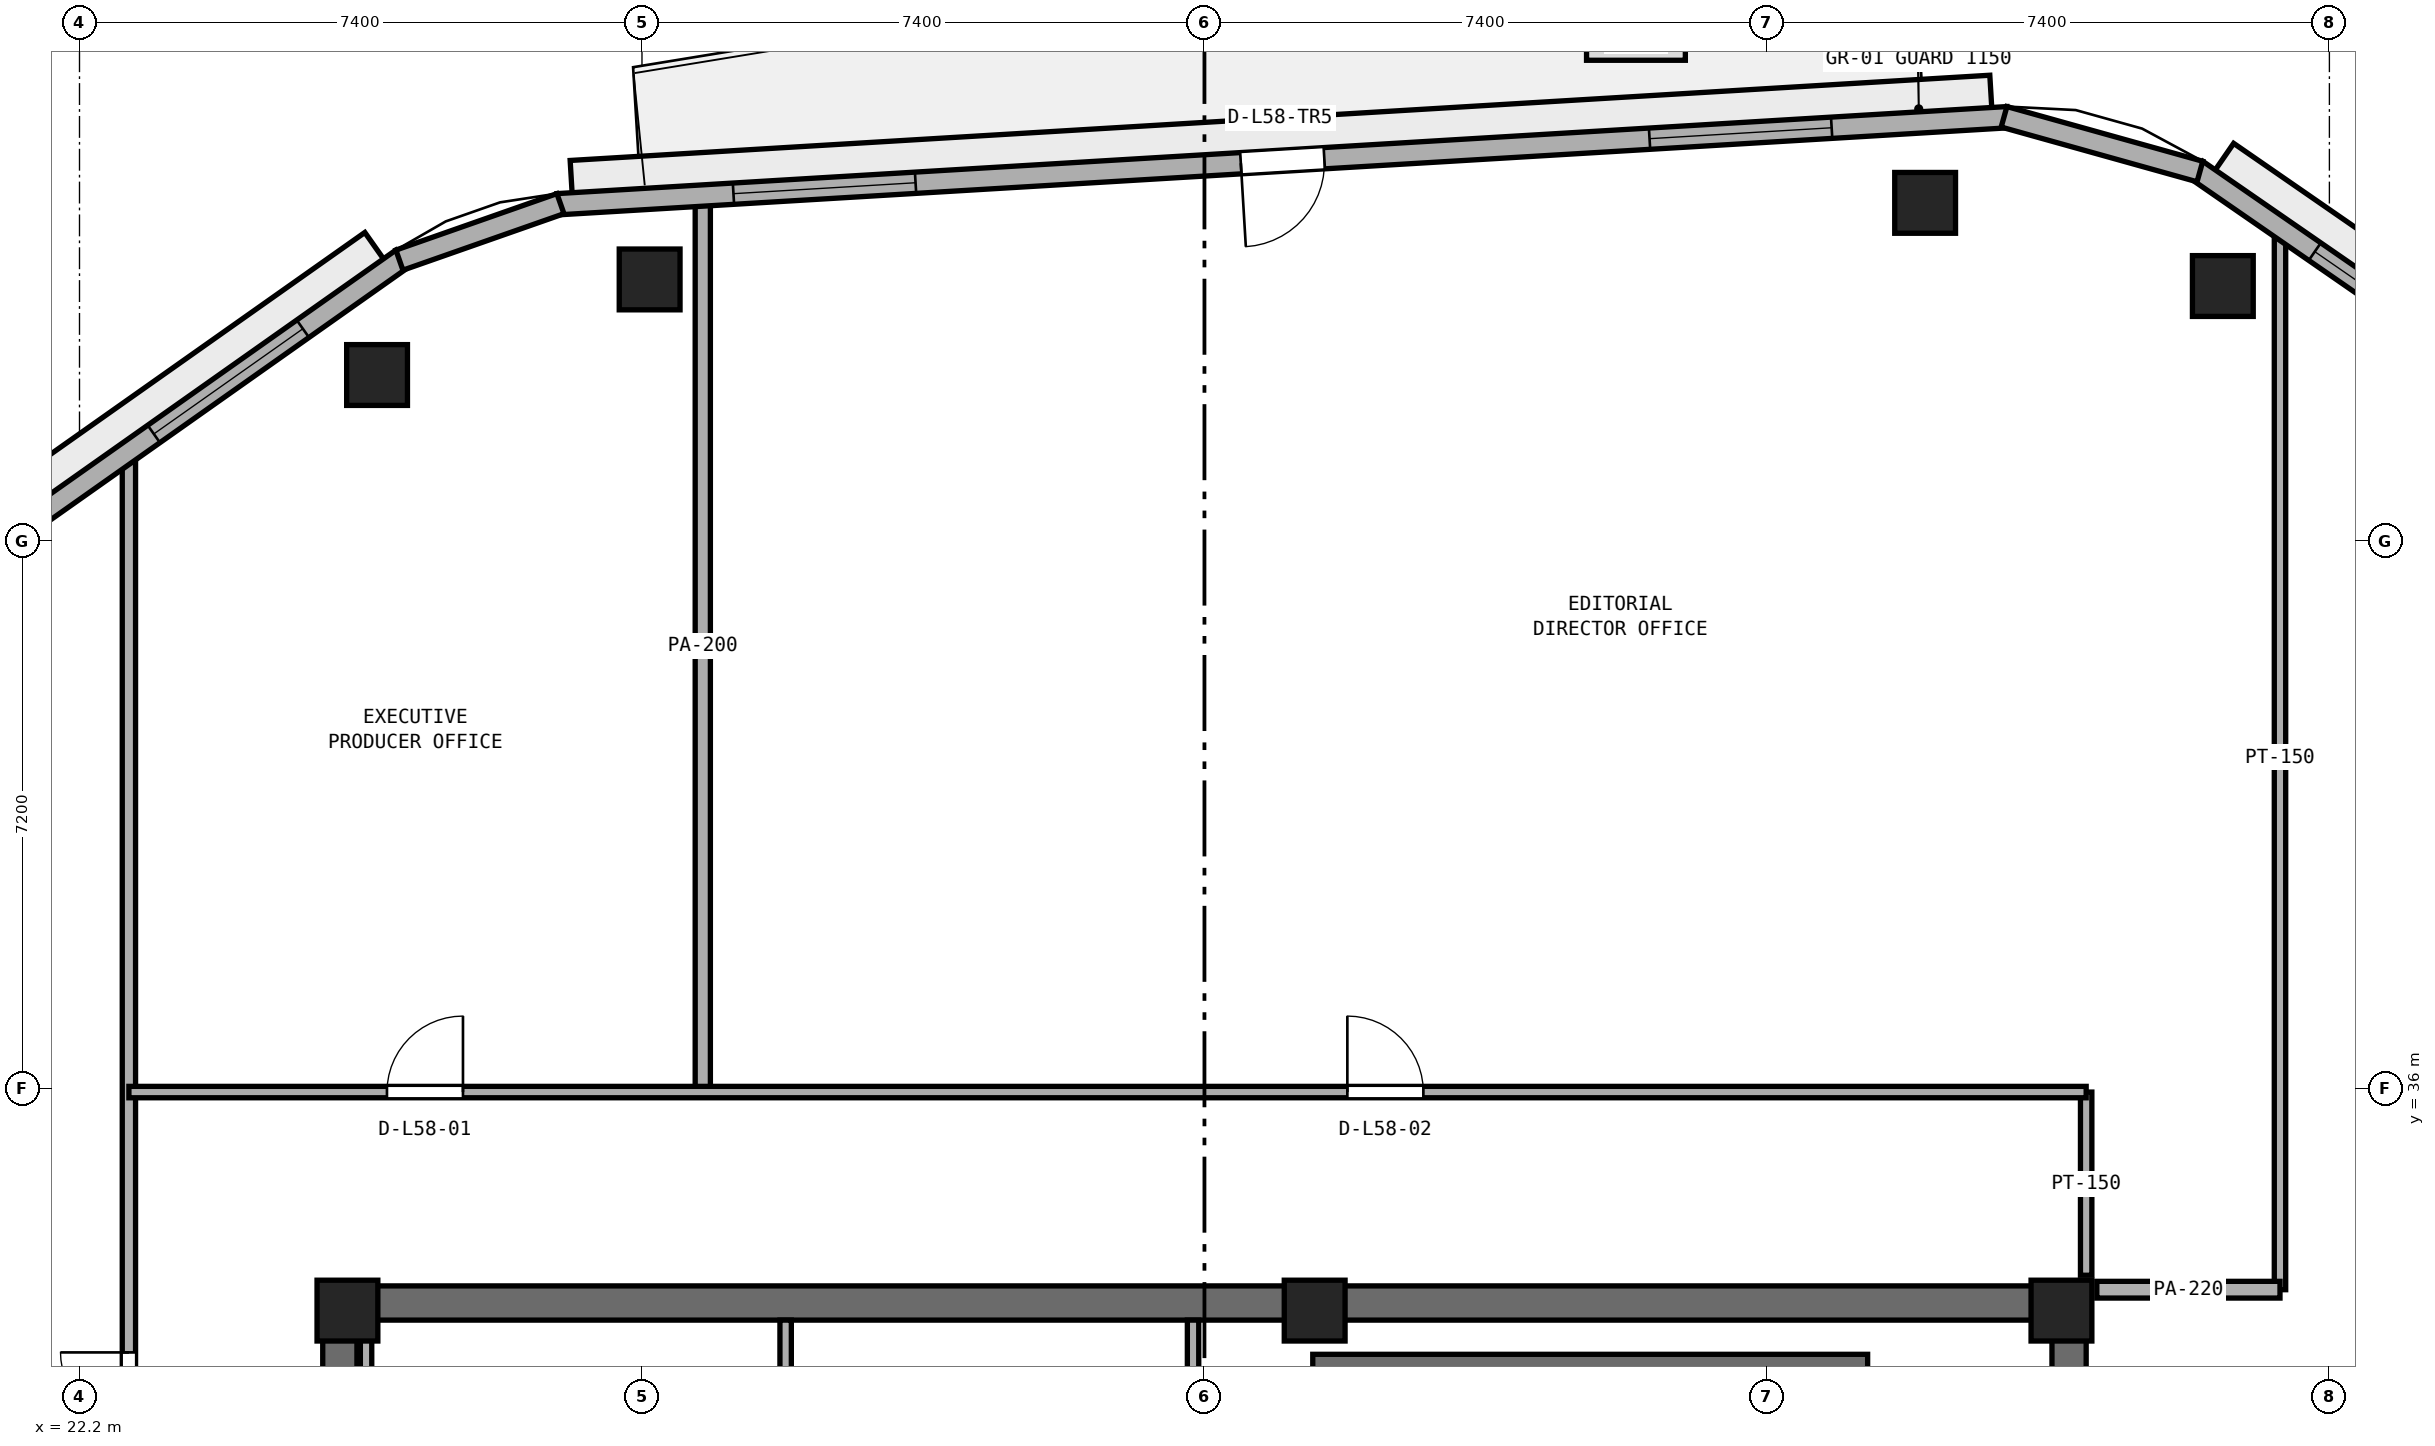
"""IFC4 building model, lengths in metres.
Left out: names, types, materials, properties, quantities, classifications, styles, units other than length and angle.
Written with IfcOpenShell. Run it as: python <this file> out.ifc"""

import sys

from ifc_helpers import new_model, si_unit, direction, frame, frame_2d, origin, origin_2d, place, context, subcontext, project, spatial, rectangle, extrude, element, fill, save


model = new_model("IFC4")
c1 = context("Model", 3, precision=1e-05, world=origin(), true_north=direction((0.0, 1.0)))
c2 = subcontext(c1, "Body", "Model", "MODEL_VIEW")
j1 = project(units=[si_unit("LENGTHUNIT", "METRE"), si_unit("PLANEANGLEUNIT", "RADIAN")], contexts=[c1])
p1 = place(None, origin())
s1 = spatial("IfcSite", under=j1, at=p1, CompositionType="ELEMENT")
p2 = place(p1, origin())
s2 = spatial("IfcBuilding", under=s1, at=p2, CompositionType="ELEMENT")
p3 = place(p2, frame((0.0, 0.0, 228.8)))
s3 = spatial("IfcBuildingStorey", under=s2, at=p3, CompositionType="ELEMENT", Elevation=228.8)
p4 = place(p3, frame((25.4, 33.175, 0.0), z_axis=(0.0, 0.0, 1.0), x_axis=(1.0, 0.0, 0.0)))
e1 = element("IfcWall", 1, at=p4, inside=s3, PredefinedType="SHEAR", context=c2, shape_type="SweptSolid", body=[
    extrude(rectangle(XDim=23.2, YDim=0.45, at=frame_2d((11.6, 0.0))), origin(), (0.0, 0.0, 1.0), 3.51),
])
p5 = place(p3, frame((25.625, 17.45, 0.0), z_axis=(0.0, 0.0, 1.0), x_axis=(0.0, 1.0, 0.0)))
e2 = element("IfcWall", 2, at=p5, inside=s3, PredefinedType="SHEAR", context=c2, shape_type="SweptSolid", body=[
    extrude(rectangle(XDim=15.5, YDim=0.45, at=frame_2d((7.75, 0.0))), origin(), (0.0, 0.0, 1.0), 3.51),
])
p6 = place(p5, frame((7.0, 0.0, 0.0)))
e3 = element("IfcOpeningElement", 3, at=p6, cuts=e2, PredefinedType="OPENING", context=c2, shape_type="SweptSolid", body=[
    extrude(rectangle(XDim=1.5, YDim=2.15, at=frame_2d((0.75, 1.075))), frame((0.0, 0.235, 0.0), z_axis=(0.0, -1.0, 0.0), x_axis=(1.0, 0.0, 0.0)), (0.0, 0.0, 1.0), 0.47),
])
p7 = place(p3, frame((48.375, 17.45, 0.0), z_axis=(0.0, 0.0, 1.0), x_axis=(0.0, 1.0, 0.0)))
e4 = element("IfcWall", 4, at=p7, inside=s3, PredefinedType="SHEAR", context=c2, shape_type="SweptSolid", body=[
    extrude(rectangle(XDim=15.5, YDim=0.45, at=frame_2d((7.75, 0.0))), origin(), (0.0, 0.0, 1.0), 3.51),
])
p8 = place(p7, frame((5.85, 0.0, 0.0)))
e5 = element("IfcOpeningElement", 5, at=p8, cuts=e4, PredefinedType="OPENING", context=c2, shape_type="SweptSolid", body=[
    extrude(rectangle(XDim=1.5, YDim=2.15, at=frame_2d((0.75, 1.075))), frame((0.0, 0.235, 0.0), z_axis=(0.0, -1.0, 0.0), x_axis=(1.0, 0.0, 0.0)), (0.0, 0.0, 1.0), 0.47),
])
for number, where, z_axis, x_axis in (
    (6, (48.275, 33.075, 0.0), (0.0, 0.0, 1.0), (1.0, 0.0, 0.0)),
    (7, (38.45, 33.075, 0.0), (0.0, 0.0, 1.0), (1.0, 0.0, 0.0)),
    (8, (25.725, 33.075, 0.0), (0.0, 0.0, 1.0), (1.0, 0.0, 0.0)),
):
    element("IfcColumn", number, at=place(p3, frame(where, z_axis=z_axis, x_axis=x_axis)), inside=s3, PredefinedType="PILASTER", context=c2, shape_type="SweptSolid", body=[
        extrude(rectangle(XDim=0.8, YDim=0.8, at=origin_2d()), origin(), (0.0, 0.0, 1.0), 3.8),
    ])
for number, where, z_axis, x_axis in (
    (9, (50.398, 46.554, 0.0), (0.0, 0.0, 1.0), (1.0, 0.0, 0.0)),
    (10, (46.481, 47.648, 0.0), (0.0, 0.0, 1.0), (1.0, 0.0, 0.0)),
    (11, (29.701, 46.641, 0.0), (0.0, 0.0, 1.0), (1.0, 0.0, 0.0)),
    (12, (26.115, 45.384, 0.0), (0.0, 0.0, 1.0), (1.0, 0.0, 0.0)),
):
    element("IfcColumn", number, at=place(p3, frame(where, z_axis=z_axis, x_axis=x_axis)), inside=s3, PredefinedType="COLUMN", context=c2, shape_type="SweptSolid", body=[
        extrude(rectangle(XDim=0.8, YDim=0.8, at=origin_2d()), origin(), (0.0, 0.0, 1.0), 3.8),
    ])
p9 = place(p3, frame((38.425, 32.375, 0.0), z_axis=(0.0, 0.0, 1.0), x_axis=(1.0, 0.0, 0.0)))
e13 = element("IfcWall", 13, at=p9, inside=s3, PredefinedType="SHEAR", context=c2, shape_type="SweptSolid", body=[
    extrude(rectangle(XDim=7.3, YDim=0.25, at=frame_2d((3.65, 0.0))), origin(), (0.0, 0.0, 1.0), 3.51),
])
p10 = place(p3, frame((25.97, 30.65, 0.0), z_axis=(0.0, 0.0, 1.0), x_axis=(0.0, 1.0, 0.0)))
e14 = element("IfcWall", 14, at=p10, inside=s3, PredefinedType="PARTITIONING", context=c2, shape_type="SweptSolid", body=[
    extrude(rectangle(XDim=2.3, YDim=0.15, at=frame_2d((1.15, 0.0))), origin(), (0.0, 0.0, 1.0), 2.61),
])
for number, where, z_axis, x_axis in (
    (15, (31.49, 30.65, 0.0), (0.0, 0.0, 1.0), (0.0, 1.0, 0.0)),
    (16, (36.85, 30.65, 0.0), (0.0, 0.0, 1.0), (0.0, 1.0, 0.0)),
):
    element("IfcWall", number, at=place(p3, frame(where, z_axis=z_axis, x_axis=x_axis)), inside=s3, PredefinedType="PARTITIONING", context=c2, shape_type="SweptSolid", body=[
        extrude(rectangle(XDim=2.3, YDim=0.15, at=frame_2d((1.15, 0.0))), origin(), (0.0, 0.0, 1.0), 3.51),
    ])
p11 = place(p3, frame((51.15, 33.35, 0.0), z_axis=(0.0, 0.0, 1.0), x_axis=(0.0, 1.0, 0.0)))
e17 = element("IfcWall", 17, at=p11, inside=s3, PredefinedType="PARTITIONING", context=c2, shape_type="SweptSolid", body=[
    extrude(rectangle(XDim=14.003, YDim=0.15, at=frame_2d((7.002, 0.0))), origin(), (0.0, 0.0, 1.0), 3.51),
])
p12 = place(p3, frame((48.6, 33.54, 0.0), z_axis=(0.0, 0.0, 1.0), x_axis=(0.0, 1.0, 0.0)))
e18 = element("IfcWall", 18, at=p12, inside=s3, PredefinedType="PARTITIONING", context=c2, shape_type="SweptSolid", body=[
    extrude(rectangle(XDim=2.41, YDim=0.15, at=frame_2d((1.205, 0.0))), origin(), (0.0, 0.0, 1.0), 2.893),
])
p13 = place(p3, frame((30.4, 35.95, 0.0), z_axis=(0.0, 0.0, 1.0), x_axis=(0.0, 1.0, 0.0)))
e19 = element("IfcWall", 19, at=p13, inside=s3, PredefinedType="PARTITIONING", context=c2, shape_type="SweptSolid", body=[
    extrude(rectangle(XDim=11.73, YDim=0.2, at=frame_2d((5.865, 0.0))), origin(), (0.0, 0.0, 1.0), 3.51),
])
p14 = place(p3, frame((22.85, 26.8, 0.0), z_axis=(0.0, 0.0, 1.0), x_axis=(0.0, 1.0, 0.0)))
e20 = element("IfcWall", 20, at=p14, inside=s3, PredefinedType="PARTITIONING", context=c2, shape_type="SweptSolid", body=[
    extrude(rectangle(XDim=17.608, YDim=0.175, at=frame_2d((8.804, 0.0))), origin(), (0.0, 0.0, 1.0), 3.51),
])
p15 = place(p14, frame((4.825, 0.0, 0.0)))
e21 = element("IfcOpeningElement", 21, at=p15, cuts=e20, PredefinedType="OPENING", context=c2, shape_type="SweptSolid", body=[
    extrude(rectangle(XDim=0.9, YDim=2.1, at=frame_2d((0.45, 1.05))), frame((0.0, 0.097, 0.0), z_axis=(0.0, -1.0, 0.0), x_axis=(1.0, 0.0, 0.0)), (0.0, 0.0, 1.0), 0.195),
])
p16 = place(p3, frame((48.74, 33.35, 0.0), z_axis=(0.0, 0.0, 1.0), x_axis=(1.0, 0.0, 0.0)))
e22 = element("IfcWall", 22, at=p16, inside=s3, PredefinedType="PARTITIONING", context=c2, shape_type="SweptSolid", body=[
    extrude(rectangle(XDim=2.41, YDim=0.22, at=frame_2d((1.205, 0.0))), origin(), (0.0, 0.0, 1.0), 2.893),
])
p17 = place(p3, frame((22.85, 35.95, 0.0), z_axis=(0.0, 0.0, 1.0), x_axis=(1.0, 0.0, 0.0)))
e23 = element("IfcWall", 23, at=p17, inside=s3, PredefinedType="PARTITIONING", context=c2, shape_type="SweptSolid", body=[
    extrude(rectangle(XDim=25.75, YDim=0.15, at=frame_2d((12.875, 0.0))), origin(), (0.0, 0.0, 1.0), 3.51),
])
p18 = place(p17, frame((3.395, 0.0, 0.0)))
e24 = element("IfcOpeningElement", 24, at=p18, cuts=e23, PredefinedType="OPENING", context=c2, shape_type="SweptSolid", body=[
    extrude(rectangle(XDim=1.0, YDim=2.12, at=frame_2d((0.5, 1.06))), frame((0.0, 0.085, 0.0), z_axis=(0.0, -1.0, 0.0), x_axis=(1.0, 0.0, 0.0)), (0.0, 0.0, 1.0), 0.17),
])
p19 = place(p17, frame((16.03, 0.0, 0.0)))
e25 = element("IfcOpeningElement", 25, at=p19, cuts=e23, PredefinedType="OPENING", context=c2, shape_type="SweptSolid", body=[
    extrude(rectangle(XDim=1.0, YDim=2.12, at=frame_2d((0.5, 1.06))), frame((0.0, 0.085, 0.0), z_axis=(0.0, -1.0, 0.0), x_axis=(1.0, 0.0, 0.0)), (0.0, 0.0, 1.0), 0.17),
])
p20 = place(p3, frame((63.651, 38.683, 0.0), z_axis=(0.0, 0.0, 1.0), x_axis=(-0.822655095, 0.568540759022, 0.0)))
e26 = element("IfcWall", 26, at=p20, inside=s3, PredefinedType="STANDARD", context=c2, shape_type="SweptSolid", body=[
    extrude(rectangle(XDim=16.528, YDim=0.28, at=frame_2d((8.264, 0.0))), origin(), (0.0, 0.0, 1.0), 3.51),
])
p21 = place(p20, frame((1.888, 0.0, 0.9)))
e27 = element("IfcOpeningElement", 27, at=p21, cuts=e26, PredefinedType="OPENING", context=c2, shape_type="SweptSolid", body=[
    extrude(rectangle(XDim=2.4, YDim=1.75, at=frame_2d((1.2, 0.875))), frame((0.0, 0.15, 0.0), z_axis=(0.0, -1.0, 0.0), x_axis=(1.0, 0.0, 0.0)), (0.0, 0.0, 1.0), 0.3),
])
p22 = place(p20, frame((7.064, 0.0, 0.9)))
e28 = element("IfcOpeningElement", 28, at=p22, cuts=e26, PredefinedType="OPENING", context=c2, shape_type="SweptSolid", body=[
    extrude(rectangle(XDim=2.4, YDim=1.75, at=frame_2d((1.2, 0.875))), frame((0.0, 0.15, 0.0), z_axis=(0.0, -1.0, 0.0), x_axis=(1.0, 0.0, 0.0)), (0.0, 0.0, 1.0), 0.3),
])
p23 = place(p20, frame((12.24, 0.0, 0.9)))
e29 = element("IfcOpeningElement", 29, at=p23, cuts=e26, PredefinedType="OPENING", context=c2, shape_type="SweptSolid", body=[
    extrude(rectangle(XDim=2.4, YDim=1.75, at=frame_2d((1.2, 0.875))), frame((0.0, 0.15, 0.0), z_axis=(0.0, -1.0, 0.0), x_axis=(1.0, 0.0, 0.0)), (0.0, 0.0, 1.0), 0.3),
])
p24 = place(p3, frame((47.566, 48.775, 0.0), z_axis=(0.0, 0.0, 1.0), x_axis=(-0.998202767485, -0.059926913695, 0.0)))
e30 = element("IfcWall", 30, at=p24, inside=s3, PredefinedType="STANDARD", context=c2, shape_type="SweptSolid", body=[
    extrude(rectangle(XDim=19.111, YDim=0.28, at=frame_2d((9.556, 0.0))), origin(), (0.0, 0.0, 1.0), 3.51),
])
p25 = place(p24, frame((9.005, 0.0, 0.0)))
e31 = element("IfcOpeningElement", 31, at=p25, cuts=e30, PredefinedType="OPENING", context=c2, shape_type="SweptSolid", body=[
    extrude(rectangle(XDim=1.1, YDim=2.2, at=frame_2d((0.55, 1.1))), frame((0.0, 0.15, 0.0), z_axis=(0.0, -1.0, 0.0), x_axis=(1.0, 0.0, 0.0)), (0.0, 0.0, 1.0), 0.3),
])
p26 = place(p24, frame((2.319, 0.0, 0.9)))
e32 = element("IfcOpeningElement", 32, at=p26, cuts=e30, PredefinedType="OPENING", context=c2, shape_type="SweptSolid", body=[
    extrude(rectangle(XDim=2.4, YDim=1.75, at=frame_2d((1.2, 0.875))), frame((0.0, 0.15, 0.0), z_axis=(0.0, -1.0, 0.0), x_axis=(1.0, 0.0, 0.0)), (0.0, 0.0, 1.0), 0.3),
])
p27 = place(p24, frame((14.392, 0.0, 0.9)))
e33 = element("IfcOpeningElement", 33, at=p27, cuts=e30, PredefinedType="OPENING", context=c2, shape_type="SweptSolid", body=[
    extrude(rectangle(XDim=2.4, YDim=1.75, at=frame_2d((1.2, 0.875))), frame((0.0, 0.15, 0.0), z_axis=(0.0, -1.0, 0.0), x_axis=(1.0, 0.0, 0.0)), (0.0, 0.0, 1.0), 0.3),
])
p28 = place(p3, frame((26.443, 46.913, 0.0), z_axis=(0.0, 0.0, 1.0), x_axis=(-0.817024179766, -0.576603407619, 0.0)))
e34 = element("IfcWall", 34, at=p28, inside=s3, PredefinedType="STANDARD", context=c2, shape_type="SweptSolid", body=[
    extrude(rectangle(XDim=17.78, YDim=0.28, at=frame_2d((8.89, 0.0))), origin(), (0.0, 0.0, 1.0), 3.51),
])
p29 = place(p28, frame((1.597, 0.0, 0.9)))
e35 = element("IfcOpeningElement", 35, at=p29, cuts=e34, PredefinedType="OPENING", context=c2, shape_type="SweptSolid", body=[
    extrude(rectangle(XDim=2.4, YDim=1.75, at=frame_2d((1.2, 0.875))), frame((0.0, 0.15, 0.0), z_axis=(0.0, -1.0, 0.0), x_axis=(1.0, 0.0, 0.0)), (0.0, 0.0, 1.0), 0.3),
])
p30 = place(p28, frame((7.69, 0.0, 0.9)))
e36 = element("IfcOpeningElement", 36, at=p30, cuts=e34, PredefinedType="OPENING", context=c2, shape_type="SweptSolid", body=[
    extrude(rectangle(XDim=2.4, YDim=1.75, at=frame_2d((1.2, 0.875))), frame((0.0, 0.15, 0.0), z_axis=(0.0, -1.0, 0.0), x_axis=(1.0, 0.0, 0.0)), (0.0, 0.0, 1.0), 0.3),
])
p31 = place(p28, frame((13.283, 0.0, 0.9)))
e37 = element("IfcOpeningElement", 37, at=p31, cuts=e34, PredefinedType="OPENING", context=c2, shape_type="SweptSolid", body=[
    extrude(rectangle(XDim=2.4, YDim=1.75, at=frame_2d((1.2, 0.875))), frame((0.0, 0.15, 0.0), z_axis=(0.0, -1.0, 0.0), x_axis=(1.0, 0.0, 0.0)), (0.0, 0.0, 1.0), 0.3),
])
p32 = place(p3, frame((50.096, 48.061, 0.0), z_axis=(0.0, 0.0, 1.0), x_axis=(-0.963108887091, 0.269112005688, 0.0)))
e38 = element("IfcWall", 38, at=p32, inside=s3, PredefinedType="STANDARD", context=c2, shape_type="SweptSolid", body=[
    extrude(rectangle(XDim=2.675, YDim=0.28, at=frame_2d((1.338, 0.0))), origin(), (0.0, 0.0, 1.0), 3.51),
])
p33 = place(p3, frame((28.527, 47.638, 0.0), z_axis=(0.0, 0.0, 1.0), x_axis=(-0.943686979207, -0.330839667022, 0.0)))
e39 = element("IfcWall", 39, at=p33, inside=s3, PredefinedType="STANDARD", context=c2, shape_type="SweptSolid", body=[
    extrude(rectangle(XDim=2.245, YDim=0.28, at=frame_2d((1.123, 0.0))), origin(), (0.0, 0.0, 1.0), 3.51),
])
p34 = place(p18, origin())
e40 = element("IfcDoor", 40, at=p34, inside=s3, OperationType="SINGLE_SWING_RIGHT", PredefinedType="DOOR", context=c2, shape_type="SweptSolid", body=[
    extrude(rectangle(XDim=1.0, YDim=2.12, at=frame_2d((0.5, 1.06))), frame((0.0, 0.025, 0.0), z_axis=(0.0, -1.0, 0.0), x_axis=(1.0, 0.0, 0.0)), (0.0, 0.0, 1.0), 0.05),
])
fill(e24, e40)
p35 = place(p19, origin())
e41 = element("IfcDoor", 41, at=p35, inside=s3, OperationType="SINGLE_SWING_LEFT", PredefinedType="DOOR", context=c2, shape_type="SweptSolid", body=[
    extrude(rectangle(XDim=1.0, YDim=2.12, at=frame_2d((0.5, 1.06))), frame((0.0, 0.025, 0.0), z_axis=(0.0, -1.0, 0.0), x_axis=(1.0, 0.0, 0.0)), (0.0, 0.0, 1.0), 0.05),
])
fill(e25, e41)
p36 = place(p15, origin())
e42 = element("IfcDoor", 42, at=p36, inside=s3, OperationType="SINGLE_SWING_RIGHT", PredefinedType="DOOR", context=c2, shape_type="SweptSolid", body=[
    extrude(rectangle(XDim=0.9, YDim=2.1, at=frame_2d((0.45, 1.05))), frame((0.0, 0.025, 0.0), z_axis=(0.0, -1.0, 0.0), x_axis=(1.0, 0.0, 0.0)), (0.0, 0.0, 1.0), 0.05),
])
fill(e21, e42)
p37 = place(p23, origin())
e43 = element("IfcWindow", 43, at=p37, inside=s3, PartitioningType="SINGLE_PANEL", PredefinedType="WINDOW", context=c2, shape_type="SweptSolid", body=[
    extrude(rectangle(XDim=2.4, YDim=1.75, at=frame_2d((1.2, 0.875))), frame((0.0, 0.03, 0.0), z_axis=(0.0, -1.0, 0.0), x_axis=(1.0, 0.0, 0.0)), (0.0, 0.0, 1.0), 0.06),
])
fill(e29, e43)
p38 = place(p25, origin())
e44 = element("IfcDoor", 44, at=p38, inside=s3, OperationType="SINGLE_SWING_RIGHT", PredefinedType="DOOR", context=c2, shape_type="SweptSolid", body=[
    extrude(rectangle(XDim=1.1, YDim=2.2, at=frame_2d((0.55, 1.1))), frame((0.0, 0.025, 0.0), z_axis=(0.0, -1.0, 0.0), x_axis=(1.0, 0.0, 0.0)), (0.0, 0.0, 1.0), 0.05),
])
fill(e31, e44)
p39 = place(p26, origin())
e45 = element("IfcWindow", 45, at=p39, inside=s3, PartitioningType="SINGLE_PANEL", PredefinedType="WINDOW", context=c2, shape_type="SweptSolid", body=[
    extrude(rectangle(XDim=2.4, YDim=1.75, at=frame_2d((1.2, 0.875))), frame((0.0, 0.03, 0.0), z_axis=(0.0, -1.0, 0.0), x_axis=(1.0, 0.0, 0.0)), (0.0, 0.0, 1.0), 0.06),
])
fill(e32, e45)
p40 = place(p27, origin())
e46 = element("IfcWindow", 46, at=p40, inside=s3, PartitioningType="SINGLE_PANEL", PredefinedType="WINDOW", context=c2, shape_type="SweptSolid", body=[
    extrude(rectangle(XDim=2.4, YDim=1.75, at=frame_2d((1.2, 0.875))), frame((0.0, 0.03, 0.0), z_axis=(0.0, -1.0, 0.0), x_axis=(1.0, 0.0, 0.0)), (0.0, 0.0, 1.0), 0.06),
])
fill(e33, e46)
p41 = place(p29, origin())
e47 = element("IfcWindow", 47, at=p41, inside=s3, PartitioningType="SINGLE_PANEL", PredefinedType="WINDOW", context=c2, shape_type="SweptSolid", body=[
    extrude(rectangle(XDim=2.4, YDim=1.75, at=frame_2d((1.2, 0.875))), frame((0.0, 0.03, 0.0), z_axis=(0.0, -1.0, 0.0), x_axis=(1.0, 0.0, 0.0)), (0.0, 0.0, 1.0), 0.06),
])
fill(e35, e47)
save(model, sys.argv[1])
